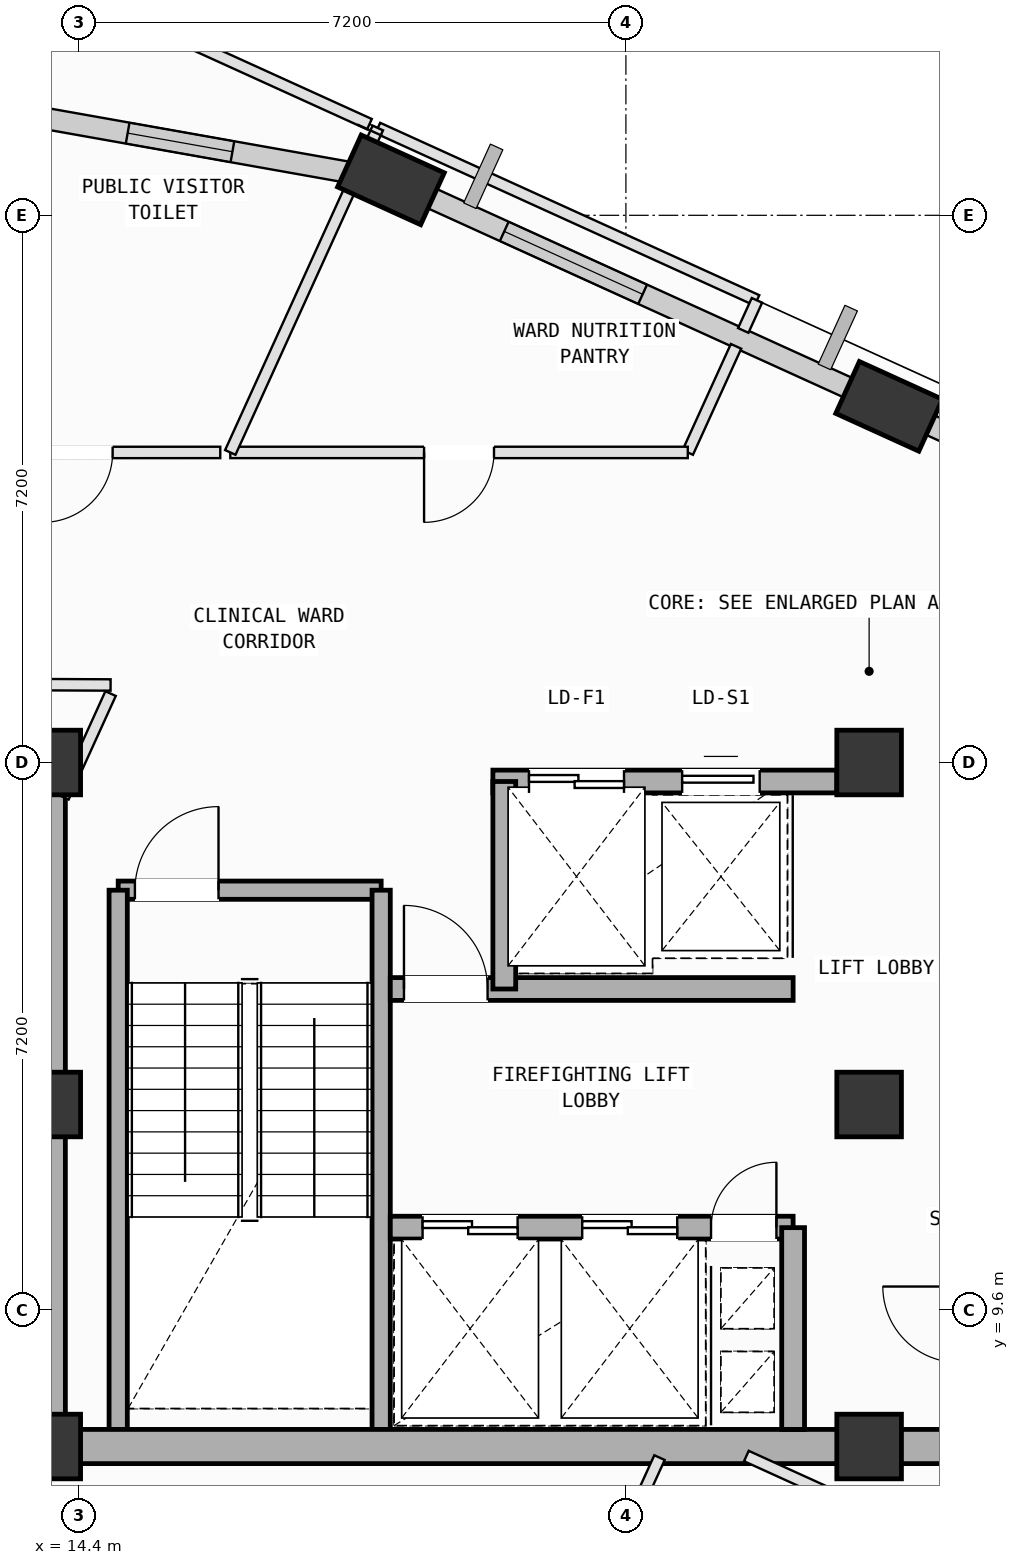
"""IFC4 building model, lengths in metres.
Left out: names, types, materials, properties, quantities, classifications, styles, units other than length and angle.
Written with IfcOpenShell. Run it as: python <this file> out.ifc"""

import sys

from ifc_helpers import new_model, si_unit, direction, frame, frame_2d, origin, origin_2d, place, context, subcontext, project, spatial, rectangle, extrude, element, fill, save


model = new_model("IFC4")
c1 = context("Model", 3, precision=1e-05, world=origin(), true_north=direction((0.0, 1.0)))
c2 = subcontext(c1, "Body", "Model", "MODEL_VIEW")
j1 = project(units=[si_unit("LENGTHUNIT", "METRE"), si_unit("PLANEANGLEUNIT", "RADIAN")], contexts=[c1])
p1 = place(None, origin())
s1 = spatial("IfcSite", under=j1, at=p1, CompositionType="ELEMENT")
p2 = place(p1, origin())
s2 = spatial("IfcBuilding", under=s1, at=p2, CompositionType="ELEMENT")
p3 = place(p2, frame((0.0, 0.0, 304.6)))
s3 = spatial("IfcBuildingStorey", under=s2, at=p3, CompositionType="ELEMENT", Elevation=304.6)
for number, where, z_axis, x_axis in (
    (1, (14.0, 7.8, 0.0), (0.0, 0.0, 1.0), (1.0, 0.0, 0.0)),
    (2, (14.0, 12.3, 0.0), (0.0, 0.0, 1.0), (1.0, 0.0, 0.0)),
    (3, (14.0, 16.8, 0.0), (0.0, 0.0, 1.0), (1.0, 0.0, 0.0)),
    (4, (24.8, 7.8, 0.0), (0.0, 0.0, 1.0), (1.0, 0.0, 0.0)),
    (5, (24.8, 12.3, 0.0), (0.0, 0.0, 1.0), (1.0, 0.0, 0.0)),
    (6, (24.8, 16.8, 0.0), (0.0, 0.0, 1.0), (1.0, 0.0, 0.0)),
):
    element("IfcColumn", number, at=place(p3, frame(where, z_axis=z_axis, x_axis=x_axis)), inside=s3, PredefinedType="COLUMN", context=c2, shape_type="SweptSolid", body=[
        extrude(rectangle(XDim=0.85, YDim=0.85, at=origin_2d()), origin(), (0.0, 0.0, 1.0), 4.0),
    ])
p4 = place(p3, frame((25.063, 21.486, 0.002), z_axis=(0.013999139803, -0.035243448451, 0.999280703019), x_axis=(-0.998707797751, 0.048336056889, 0.015695869403)))
e7 = element("IfcColumn", 7, at=p4, inside=s3, PredefinedType="COLUMN", context=c2, shape_type="SweptSolid", body=[
    extrude(rectangle(XDim=1.2, YDim=0.75, at=origin_2d()), origin(), (0.0, 0.0, 1.0), 3.976),
])
p5 = place(p3, frame((18.509, 24.466, 0.002), z_axis=(0.001907962149, -0.062408826429, 0.99804884553), x_axis=(-0.92252082505, 0.385081115761, 0.025843019053)))
e8 = element("IfcColumn", 8, at=p5, inside=s3, PredefinedType="COLUMN", context=c2, shape_type="SweptSolid", body=[
    extrude(rectangle(XDim=1.2, YDim=0.75, at=origin_2d()), origin(), (0.0, 0.0, 1.0), 3.967),
])
p6 = place(p3, frame((25.471, 21.301, 0.0), z_axis=(0.0, 0.0, 1.0), x_axis=(0.910323213303, -0.413898112247, 0.0)))
e9 = element("IfcWall", 9, at=p6, inside=s3, PredefinedType="SOLIDWALL", context=c2, shape_type="SweptSolid", body=[
    extrude(rectangle(XDim=6.958, YDim=0.28, at=frame_2d((3.479, 0.0))), origin(), (0.0, 0.0, 1.0), 2.765),
])
p7 = place(p3, frame((18.906, 24.286, 0.0), z_axis=(0.0, 0.0, 1.0), x_axis=(0.910319616875, -0.413906022101, 0.0)))
e10 = element("IfcWall", 10, at=p7, inside=s3, PredefinedType="SOLIDWALL", context=c2, shape_type="SweptSolid", body=[
    extrude(rectangle(XDim=6.424, YDim=0.28, at=frame_2d((3.212, 0.0))), origin(), (0.0, 0.0, 1.0), 3.265),
])
p8 = place(p7, frame((1.201, 0.0, 0.75)))
e11 = element("IfcOpeningElement", 11, at=p8, cuts=e10, PredefinedType="OPENING", context=c2, shape_type="SweptSolid", body=[
    extrude(rectangle(XDim=2.0, YDim=1.95, at=frame_2d((1.0, 0.975))), frame((0.0, 0.15, 0.0), z_axis=(0.0, -1.0, 0.0), x_axis=(1.0, 0.0, 0.0)), (0.0, 0.0, 1.0), 0.3),
])
p9 = place(p3, frame((12.941, 25.455, 0.0), z_axis=(0.0, 0.0, 1.0), x_axis=(0.984598986334, -0.174828018664, 0.0)))
e12 = element("IfcWall", 12, at=p9, inside=s3, PredefinedType="SOLIDWALL", context=c2, shape_type="SweptSolid", body=[
    extrude(rectangle(XDim=5.302, YDim=0.28, at=frame_2d((2.651, 0.0))), origin(), (0.0, 0.0, 1.0), 3.265),
])
p10 = place(p9, frame((2.137, 0.0, 0.75)))
e13 = element("IfcOpeningElement", 13, at=p10, cuts=e12, PredefinedType="OPENING", context=c2, shape_type="SweptSolid", body=[
    extrude(rectangle(XDim=1.4, YDim=1.85, at=frame_2d((0.7, 0.925))), frame((0.0, 0.15, 0.0), z_axis=(0.0, -1.0, 0.0), x_axis=(1.0, 0.0, 0.0)), (0.0, 0.0, 1.0), 0.3),
])
p11 = place(p3, frame((14.92, 15.12, 0.0), z_axis=(0.0, 0.0, 1.0), x_axis=(1.0, 0.0, 0.0)))
e14 = element("IfcWall", 14, at=p11, inside=s3, PredefinedType="SOLIDWALL", context=c2, shape_type="SweptSolid", body=[
    extrude(rectangle(XDim=3.46, YDim=0.24, at=frame_2d((1.73, 0.0))), origin(), (0.0, 0.0, 1.0), 3.78),
])
p12 = place(p11, frame((0.22, 0.0, 0.0)))
e15 = element("IfcOpeningElement", 15, at=p12, cuts=e14, PredefinedType="OPENING", context=c2, shape_type="SweptSolid", body=[
    extrude(rectangle(XDim=1.1, YDim=2.15, at=frame_2d((0.55, 1.075))), frame((0.0, 0.13, 0.0), z_axis=(0.0, -1.0, 0.0), x_axis=(1.0, 0.0, 0.0)), (0.0, 0.0, 1.0), 0.26),
])
for number, where, z_axis, x_axis in (
    (16, (18.38, 15.12, 0.0), (0.0, 0.0, 1.0), (0.0, -1.0, 0.0)),
    (17, (14.92, 8.025, 0.0), (0.0, 0.0, 1.0), (0.0, 1.0, 0.0)),
):
    element("IfcWall", number, at=place(p3, frame(where, z_axis=z_axis, x_axis=x_axis)), inside=s3, PredefinedType="SOLIDWALL", context=c2, shape_type="SweptSolid", body=[
        extrude(rectangle(XDim=7.095, YDim=0.24, at=frame_2d((3.548, 0.0))), origin(), (0.0, 0.0, 1.0), 3.78),
    ])
for number, where, z_axis, x_axis in (
    (18, (14.0, 7.8, 0.0), (0.0, 0.0, 1.0), (1.0, 0.0, 0.0)),
    (19, (24.8, 7.8, 0.0), (0.0, 0.0, 1.0), (1.0, 0.0, 0.0)),
):
    element("IfcWall", number, at=place(p3, frame(where, z_axis=z_axis, x_axis=x_axis)), inside=s3, PredefinedType="SHEAR", context=c2, shape_type="SweptSolid", body=[
        extrude(rectangle(XDim=10.8, YDim=0.45, at=frame_2d((5.4, 0.0))), origin(), (0.0, 0.0, 1.0), 3.78),
    ])
p13 = place(p3, frame((14.0, 16.8, 0.0), z_axis=(0.0, 0.0, 1.0), x_axis=(0.0, -1.0, 0.0)))
e20 = element("IfcWall", 20, at=p13, inside=s3, PredefinedType="SHEAR", context=c2, shape_type="SweptSolid", body=[
    extrude(rectangle(XDim=9.0, YDim=0.45, at=frame_2d((4.5, 0.0))), origin(), (0.0, 0.0, 1.0), 3.78),
])
p14 = place(p3, frame((19.85, 16.55, 0.0), z_axis=(0.0, 0.0, 1.0), x_axis=(1.0, 0.0, 0.0)))
e21 = element("IfcWall", 21, at=p14, inside=s3, PredefinedType="SOLIDWALL", context=c2, shape_type="SweptSolid", body=[
    extrude(rectangle(XDim=4.525, YDim=0.3, at=frame_2d((2.262, 0.0))), origin(), (0.0, 0.0, 1.0), 3.78),
])
p15 = place(p14, frame((0.475, 0.0, 0.0)))
e22 = element("IfcOpeningElement", 22, at=p15, cuts=e21, PredefinedType="OPENING", context=c2, shape_type="SweptSolid", body=[
    extrude(rectangle(XDim=1.25, YDim=2.18, at=frame_2d((0.625, 1.09))), frame((0.0, 0.16, 0.0), z_axis=(0.0, -1.0, 0.0), x_axis=(1.0, 0.0, 0.0)), (0.0, 0.0, 1.0), 0.32),
])
p16 = place(p14, frame((2.49, 0.0, 0.0)))
e23 = element("IfcOpeningElement", 23, at=p16, cuts=e21, PredefinedType="OPENING", context=c2, shape_type="SweptSolid", body=[
    extrude(rectangle(XDim=1.02, YDim=2.12, at=frame_2d((0.51, 1.06))), frame((0.0, 0.16, 0.0), z_axis=(0.0, -1.0, 0.0), x_axis=(1.0, 0.0, 0.0)), (0.0, 0.0, 1.0), 0.32),
])
p17 = place(p3, frame((18.5, 10.68, 0.0), z_axis=(0.0, 0.0, 1.0), x_axis=(1.0, 0.0, 0.0)))
e24 = element("IfcWall", 24, at=p17, inside=s3, PredefinedType="SOLIDWALL", context=c2, shape_type="SweptSolid", body=[
    extrude(rectangle(XDim=5.3, YDim=0.3, at=frame_2d((2.65, 0.0))), origin(), (0.0, 0.0, 1.0), 3.78),
])
p18 = place(p17, frame((4.22, 0.0, 0.0)))
e25 = element("IfcOpeningElement", 25, at=p18, cuts=e24, PredefinedType="OPENING", context=c2, shape_type="SweptSolid", body=[
    extrude(rectangle(XDim=0.86, YDim=2.06, at=frame_2d((0.43, 1.03))), frame((0.0, 0.16, 0.0), z_axis=(0.0, -1.0, 0.0), x_axis=(1.0, 0.0, 0.0)), (0.0, 0.0, 1.0), 0.32),
])
p19 = place(p17, frame((0.425, 0.0, 0.0)))
e26 = element("IfcOpeningElement", 26, at=p19, cuts=e24, PredefinedType="OPENING", context=c2, shape_type="SweptSolid", body=[
    extrude(rectangle(XDim=1.25, YDim=2.18, at=frame_2d((0.625, 1.09))), frame((0.0, 0.16, 0.0), z_axis=(0.0, -1.0, 0.0), x_axis=(1.0, 0.0, 0.0)), (0.0, 0.0, 1.0), 0.32),
])
p20 = place(p17, frame((2.525, 0.0, 0.0)))
e27 = element("IfcOpeningElement", 27, at=p20, cuts=e24, PredefinedType="OPENING", context=c2, shape_type="SweptSolid", body=[
    extrude(rectangle(XDim=1.25, YDim=2.18, at=frame_2d((0.625, 1.09))), frame((0.0, 0.16, 0.0), z_axis=(0.0, -1.0, 0.0), x_axis=(1.0, 0.0, 0.0)), (0.0, 0.0, 1.0), 0.32),
])
p21 = place(p3, frame((18.5, 13.82, 0.0), z_axis=(0.0, 0.0, 1.0), x_axis=(1.0, 0.0, 0.0)))
e28 = element("IfcWall", 28, at=p21, inside=s3, PredefinedType="SOLIDWALL", context=c2, shape_type="SweptSolid", body=[
    extrude(rectangle(XDim=5.3, YDim=0.3, at=frame_2d((2.65, 0.0))), origin(), (0.0, 0.0, 1.0), 3.78),
])
p22 = place(p21, frame((0.18, 0.0, 0.0)))
e29 = element("IfcOpeningElement", 29, at=p22, cuts=e28, PredefinedType="OPENING", context=c2, shape_type="SweptSolid", body=[
    extrude(rectangle(XDim=1.1, YDim=2.15, at=frame_2d((0.55, 1.075))), frame((0.0, 0.16, 0.0), z_axis=(0.0, -1.0, 0.0), x_axis=(1.0, 0.0, 0.0)), (0.0, 0.0, 1.0), 0.32),
])
p23 = place(p3, frame((23.8, 8.025, 0.0), z_axis=(0.0, 0.0, 1.0), x_axis=(0.0, 1.0, 0.0)))
e30 = element("IfcWall", 30, at=p23, inside=s3, PredefinedType="SOLIDWALL", context=c2, shape_type="SweptSolid", body=[
    extrude(rectangle(XDim=2.655, YDim=0.3, at=frame_2d((1.328, 0.0))), origin(), (0.0, 0.0, 1.0), 3.78),
])
p24 = place(p3, frame((20.0, 13.82, 0.0), z_axis=(0.0, 0.0, 1.0), x_axis=(0.0, 1.0, 0.0)))
e31 = element("IfcWall", 31, at=p24, inside=s3, PredefinedType="SOLIDWALL", context=c2, shape_type="SweptSolid", body=[
    extrude(rectangle(XDim=2.73, YDim=0.3, at=frame_2d((1.365, 0.0))), origin(), (0.0, 0.0, 1.0), 3.78),
])
p25 = place(p3, frame((19.979, 3.117, 0.0), z_axis=(0.0, 0.0, 1.0), x_axis=(0.413913658196, 0.910316144841, 0.0)))
e32 = element("IfcWall", 32, at=p25, inside=s3, PredefinedType="PARTITIONING", context=c2, shape_type="SweptSolid", body=[
    extrude(rectangle(XDim=4.984, YDim=0.15, at=frame_2d((2.492, 0.0))), origin(), (0.0, 0.0, 1.0), 3.78),
])
p26 = place(p25, frame((1.977, 0.0, 0.0)))
e33 = element("IfcOpeningElement", 33, at=p26, cuts=e32, PredefinedType="OPENING", context=c2, shape_type="SweptSolid", body=[
    extrude(rectangle(XDim=0.86, YDim=2.06, at=frame_2d((0.43, 1.03))), frame((0.0, 0.085, 0.0), z_axis=(0.0, -1.0, 0.0), x_axis=(1.0, 0.0, 0.0)), (0.0, 0.0, 1.0), 0.17),
])
p27 = place(p3, frame((23.185, 7.675, 0.0), z_axis=(0.0, 0.0, 1.0), x_axis=(0.910292616599, -0.413965399721, 0.0)))
e34 = element("IfcWall", 34, at=p27, inside=s3, PredefinedType="PARTITIONING", context=c2, shape_type="SweptSolid", body=[
    extrude(rectangle(XDim=5.208, YDim=0.15, at=frame_2d((2.604, 0.0))), origin(), (0.0, 0.0, 1.0), 3.78),
])
p28 = place(p3, frame((18.336, 25.149, 0.0), z_axis=(0.0, 0.0, 1.0), x_axis=(0.910329852278, -0.413883510245, 0.0)))
e35 = element("IfcWall", 35, at=p28, inside=s3, PredefinedType="PARTITIONING", context=c2, shape_type="SweptSolid", body=[
    extrude(rectangle(XDim=5.479, YDim=0.15, at=frame_2d((2.74, 0.0))), origin(), (0.0, 0.0, 1.0), 3.78),
])
p29 = place(p3, frame((23.324, 22.881, 0.0), z_axis=(0.0, 0.0, 1.0), x_axis=(-0.413676071727, -0.910424136148, 0.0)))
e36 = element("IfcWall", 36, at=p29, inside=s3, PredefinedType="PARTITIONING", context=c2, shape_type="SweptSolid", body=[
    extrude(rectangle(XDim=0.435, YDim=0.15, at=frame_2d((0.218, 0.0))), origin(), (0.0, 0.0, 1.0), 3.78),
])
p30 = place(p3, frame((23.049, 22.276, 0.0), z_axis=(0.0, 0.0, 1.0), x_axis=(-0.414054798552, -0.910251956217, 0.0)))
e37 = element("IfcWall", 37, at=p30, inside=s3, PredefinedType="PARTITIONING", context=c2, shape_type="SweptSolid", body=[
    extrude(rectangle(XDim=1.534, YDim=0.15, at=frame_2d((0.767, 0.0))), origin(), (0.0, 0.0, 1.0), 3.78),
])
p31 = place(p3, frame((22.414, 20.88, 0.0), z_axis=(0.0, 0.0, 1.0), x_axis=(-1.0, 0.0, 0.0)))
e38 = element("IfcWall", 38, at=p31, inside=s3, PredefinedType="PARTITIONING", context=c2, shape_type="SweptSolid", body=[
    extrude(rectangle(XDim=6.019, YDim=0.15, at=frame_2d((3.01, 0.0))), origin(), (0.0, 0.0, 1.0), 3.415),
])
p32 = place(p31, frame((2.55, 0.0, 0.0)))
e39 = element("IfcOpeningElement", 39, at=p32, cuts=e38, PredefinedType="OPENING", context=c2, shape_type="SweptSolid", body=[
    extrude(rectangle(XDim=0.92, YDim=2.1, at=frame_2d((0.46, 1.05))), frame((0.0, 0.085, 0.0), z_axis=(0.0, -1.0, 0.0), x_axis=(1.0, 0.0, 0.0)), (0.0, 0.0, 1.0), 0.17),
])
p33 = place(p3, frame((16.395, 20.88, 0.0), z_axis=(0.0, 0.0, 1.0), x_axis=(0.413930001639, 0.910308713428, 0.0)))
e40 = element("IfcWall", 40, at=p33, inside=s3, PredefinedType="PARTITIONING", context=c2, shape_type="SweptSolid", body=[
    extrude(rectangle(XDim=3.909, YDim=0.15, at=frame_2d((1.954, 0.0))), origin(), (0.0, 0.0, 1.0), 2.765),
])
p34 = place(p3, frame((18.111, 24.654, 0.0), z_axis=(0.0, 0.0, 1.0), x_axis=(0.413667579313, 0.91042799486, 0.0)))
e41 = element("IfcWall", 41, at=p34, inside=s3, PredefinedType="PARTITIONING", context=c2, shape_type="SweptSolid", body=[
    extrude(rectangle(XDim=0.543, YDim=0.15, at=frame_2d((0.272, 0.0))), origin(), (0.0, 0.0, 1.0), 3.78),
])
p35 = place(p3, frame((12.527, 17.831, 0.0), z_axis=(0.0, 0.0, 1.0), x_axis=(0.999988521863, -0.004791256759, 0.0)))
e42 = element("IfcWall", 42, at=p35, inside=s3, PredefinedType="PARTITIONING", context=c2, shape_type="SweptSolid", body=[
    extrude(rectangle(XDim=2.293, YDim=0.15, at=frame_2d((1.146, 0.0))), origin(), (0.0, 0.0, 1.0), 3.78),
])
p36 = place(p3, frame((14.82, 17.707, 0.0), z_axis=(0.0, 0.0, 1.0), x_axis=(-0.414110008053, -0.910226840535, 0.0)))
e43 = element("IfcWall", 43, at=p36, inside=s3, PredefinedType="PARTITIONING", context=c2, shape_type="SweptSolid", body=[
    extrude(rectangle(XDim=1.498, YDim=0.15, at=frame_2d((0.749, 0.0))), origin(), (0.0, 0.0, 1.0), 2.765),
])
p37 = place(p3, frame((13.676, 25.676, 0.0), z_axis=(0.0, 0.0, 1.0), x_axis=(0.413955262856, 0.910297226379, 0.0)))
e44 = element("IfcWall", 44, at=p37, inside=s3, PredefinedType="PARTITIONING", context=c2, shape_type="SweptSolid", body=[
    extrude(rectangle(XDim=1.449, YDim=0.15, at=frame_2d((0.725, 0.0))), origin(), (0.0, 0.0, 1.0), 3.78),
])
p38 = place(p3, frame((14.322, 26.974, 0.0), z_axis=(0.0, 0.0, 1.0), x_axis=(0.910315782424, -0.413914455256, 0.0)))
e45 = element("IfcWall", 45, at=p38, inside=s3, PredefinedType="PARTITIONING", context=c2, shape_type="SweptSolid", body=[
    extrude(rectangle(XDim=4.289, YDim=0.15, at=frame_2d((2.144, 0.0))), origin(), (0.0, 0.0, 1.0), 3.78),
])
p39 = place(p3, frame((16.263, 20.88, 0.0), z_axis=(0.0, 0.0, 1.0), x_axis=(-0.999999966127, -0.000260281095, 0.0)))
e46 = element("IfcWall", 46, at=p39, inside=s3, PredefinedType="PARTITIONING", context=c2, shape_type="SweptSolid", body=[
    extrude(rectangle(XDim=3.752, YDim=0.15, at=frame_2d((1.876, 0.0))), origin(), (0.0, 0.0, 1.0), 3.415),
])
p40 = place(p39, frame((1.416, 0.0, 0.0)))
e47 = element("IfcOpeningElement", 47, at=p40, cuts=e46, PredefinedType="OPENING", context=c2, shape_type="SweptSolid", body=[
    extrude(rectangle(XDim=0.92, YDim=2.1, at=frame_2d((0.46, 1.05))), frame((0.0, 0.085, 0.0), z_axis=(0.0, -1.0, 0.0), x_axis=(1.0, 0.0, 0.0)), (0.0, 0.0, 1.0), 0.17),
])
p41 = place(p8, origin())
e48 = element("IfcWindow", 48, at=p41, inside=s3, PartitioningType="SINGLE_PANEL", PredefinedType="WINDOW", context=c2, shape_type="SweptSolid", body=[
    extrude(rectangle(XDim=2.0, YDim=1.95, at=frame_2d((1.0, 0.975))), frame((0.0, 0.03, 0.0), z_axis=(0.0, -1.0, 0.0), x_axis=(1.0, 0.0, 0.0)), (0.0, 0.0, 1.0), 0.06),
])
fill(e11, e48)
p42 = place(p10, origin())
e49 = element("IfcWindow", 49, at=p42, inside=s3, PartitioningType="SINGLE_PANEL", PredefinedType="WINDOW", context=c2, shape_type="SweptSolid", body=[
    extrude(rectangle(XDim=1.4, YDim=1.85, at=frame_2d((0.7, 0.925))), frame((0.0, 0.03, 0.0), z_axis=(0.0, -1.0, 0.0), x_axis=(1.0, 0.0, 0.0)), (0.0, 0.0, 1.0), 0.06),
])
fill(e13, e49)
p43 = place(p12, origin())
e50 = element("IfcDoor", 50, at=p43, inside=s3, OperationType="SINGLE_SWING_RIGHT", PredefinedType="DOOR", context=c2, shape_type="SweptSolid", body=[
    extrude(rectangle(XDim=1.1, YDim=2.15, at=frame_2d((0.55, 1.075))), frame((0.0, 0.025, 0.0), z_axis=(0.0, -1.0, 0.0), x_axis=(1.0, 0.0, 0.0)), (0.0, 0.0, 1.0), 0.05),
])
fill(e15, e50)
p44 = place(p18, origin())
e51 = element("IfcDoor", 51, at=p44, inside=s3, OperationType="SINGLE_SWING_RIGHT", PredefinedType="DOOR", context=c2, shape_type="SweptSolid", body=[
    extrude(rectangle(XDim=0.86, YDim=2.06, at=frame_2d((0.43, 1.03))), frame((0.0, 0.025, 0.0), z_axis=(0.0, -1.0, 0.0), x_axis=(1.0, 0.0, 0.0)), (0.0, 0.0, 1.0), 0.05),
])
fill(e25, e51)
p45 = place(p22, origin())
e52 = element("IfcDoor", 52, at=p45, inside=s3, OperationType="SINGLE_SWING_LEFT", PredefinedType="DOOR", context=c2, shape_type="SweptSolid", body=[
    extrude(rectangle(XDim=1.1, YDim=2.15, at=frame_2d((0.55, 1.075))), frame((0.0, 0.025, 0.0), z_axis=(0.0, -1.0, 0.0), x_axis=(1.0, 0.0, 0.0)), (0.0, 0.0, 1.0), 0.05),
])
fill(e29, e52)
p46 = place(p19, origin())
e53 = element("IfcDoor", 53, at=p46, inside=s3, OperationType="DOUBLE_DOOR_SLIDING", PredefinedType="DOOR", context=c2, shape_type="SweptSolid", body=[
    extrude(rectangle(XDim=1.25, YDim=2.18, at=frame_2d((0.625, 1.09))), frame((0.0, 0.025, 0.0), z_axis=(0.0, -1.0, 0.0), x_axis=(1.0, 0.0, 0.0)), (0.0, 0.0, 1.0), 0.05),
])
fill(e26, e53)
p47 = place(p20, origin())
e54 = element("IfcDoor", 54, at=p47, inside=s3, OperationType="DOUBLE_DOOR_SLIDING", PredefinedType="DOOR", context=c2, shape_type="SweptSolid", body=[
    extrude(rectangle(XDim=1.25, YDim=2.18, at=frame_2d((0.625, 1.09))), frame((0.0, 0.025, 0.0), z_axis=(0.0, -1.0, 0.0), x_axis=(1.0, 0.0, 0.0)), (0.0, 0.0, 1.0), 0.05),
])
fill(e27, e54)
p48 = place(p15, origin())
e55 = element("IfcDoor", 55, at=p48, inside=s3, OperationType="DOUBLE_DOOR_SLIDING", PredefinedType="DOOR", context=c2, shape_type="SweptSolid", body=[
    extrude(rectangle(XDim=1.25, YDim=2.18, at=frame_2d((0.625, 1.09))), frame((0.0, 0.025, 0.0), z_axis=(0.0, -1.0, 0.0), x_axis=(1.0, 0.0, 0.0)), (0.0, 0.0, 1.0), 0.05),
])
fill(e22, e55)
p49 = place(p16, origin())
e56 = element("IfcDoor", 56, at=p49, inside=s3, OperationType="SLIDING_TO_LEFT", PredefinedType="DOOR", context=c2, shape_type="SweptSolid", body=[
    extrude(rectangle(XDim=1.02, YDim=2.12, at=frame_2d((0.51, 1.06))), frame((0.0, 0.025, 0.0), z_axis=(0.0, -1.0, 0.0), x_axis=(1.0, 0.0, 0.0)), (0.0, 0.0, 1.0), 0.05),
])
fill(e23, e56)
p50 = place(p32, origin())
e57 = element("IfcDoor", 57, at=p50, inside=s3, OperationType="SINGLE_SWING_RIGHT", PredefinedType="DOOR", context=c2, shape_type="SweptSolid", body=[
    extrude(rectangle(XDim=0.92, YDim=2.1, at=frame_2d((0.46, 1.05))), frame((0.0, 0.025, 0.0), z_axis=(0.0, -1.0, 0.0), x_axis=(1.0, 0.0, 0.0)), (0.0, 0.0, 1.0), 0.05),
])
fill(e39, e57)
p51 = place(p40, origin())
e58 = element("IfcDoor", 58, at=p51, inside=s3, OperationType="SINGLE_SWING_RIGHT", PredefinedType="DOOR", context=c2, shape_type="SweptSolid", body=[
    extrude(rectangle(XDim=0.92, YDim=2.1, at=frame_2d((0.46, 1.05))), frame((0.0, 0.025, 0.0), z_axis=(0.0, -1.0, 0.0), x_axis=(1.0, 0.0, 0.0)), (0.0, 0.0, 1.0), 0.05),
])
fill(e47, e58)
save(model, sys.argv[1])
